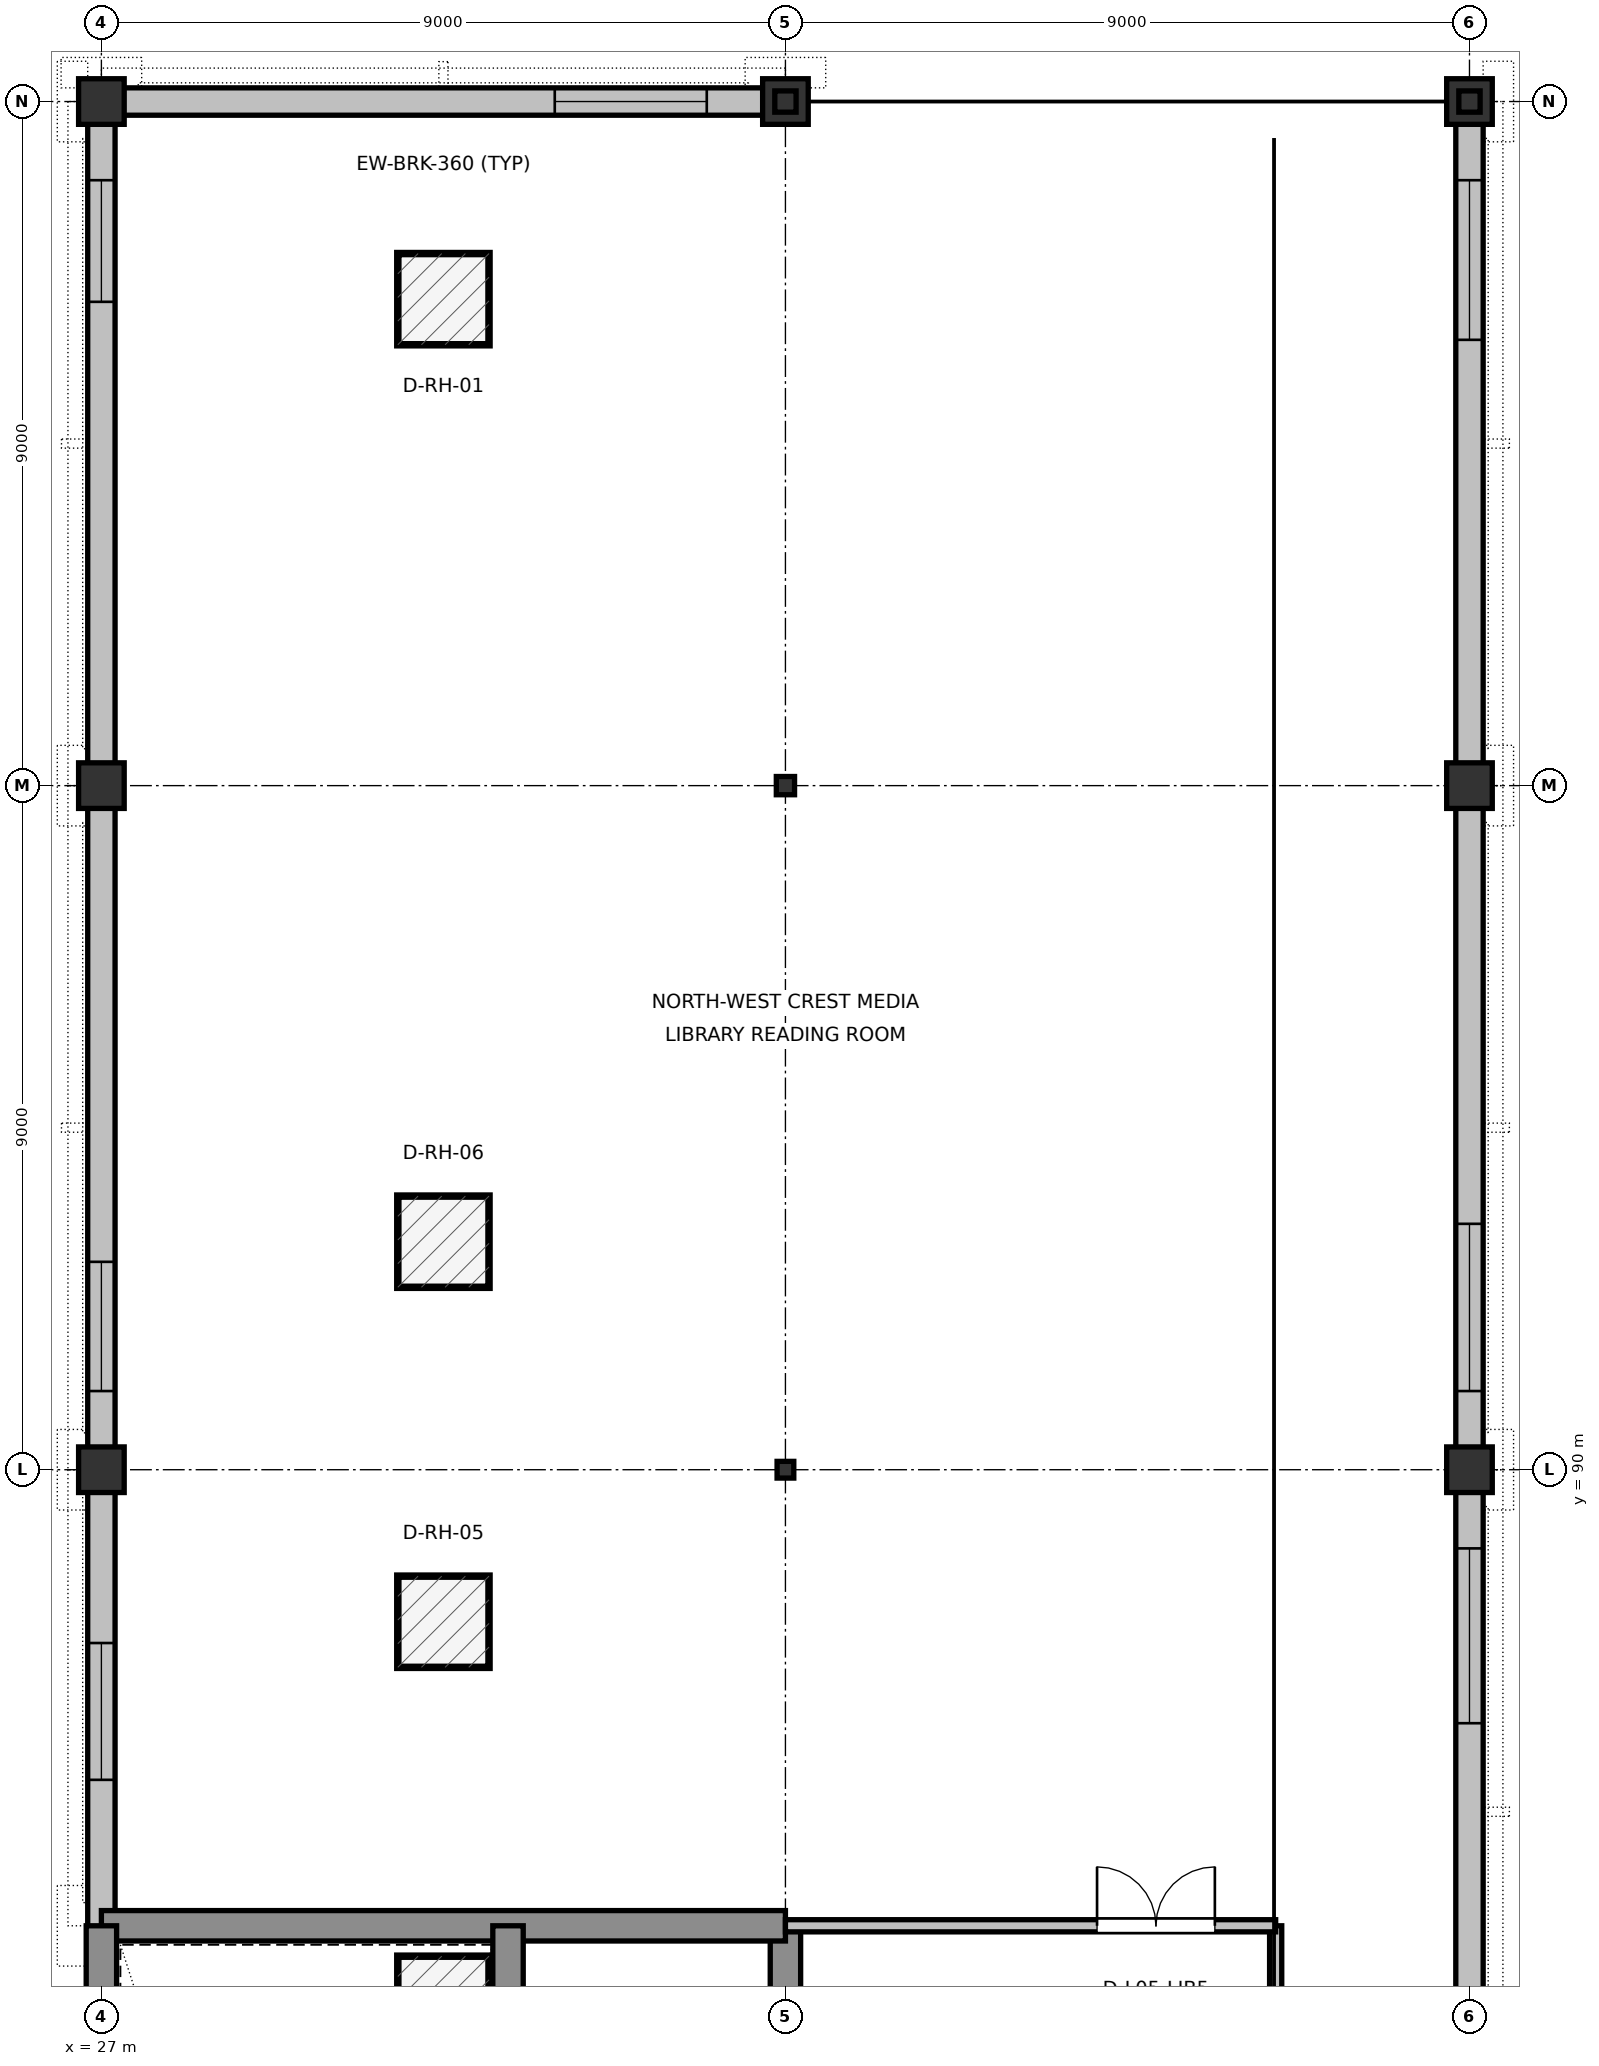
"""IFC4 building model, lengths in metres.
Left out: names, types, materials, properties, quantities, classifications, styles, units other than length and angle.
Written with IfcOpenShell. Run it as: python <this file> out.ifc"""

import sys

from ifc_helpers import new_model, si_unit, direction, frame, frame_2d, origin, origin_2d, place, context, subcontext, project, spatial, rectangle, hollow_rectangle, i_section, extrude, element, fill, save


model = new_model("IFC4")
c1 = context("Model", 3, precision=1e-05, world=origin(), true_north=direction((0.0, 1.0)))
c2 = subcontext(c1, "Body", "Model", "MODEL_VIEW")
j1 = project(units=[si_unit("LENGTHUNIT", "METRE"), si_unit("PLANEANGLEUNIT", "RADIAN")], contexts=[c1])
p1 = place(None, origin())
s1 = spatial("IfcSite", under=j1, at=p1, CompositionType="ELEMENT")
p2 = place(p1, origin())
s2 = spatial("IfcBuilding", under=s1, at=p2, CompositionType="ELEMENT")
p3 = place(p2, frame((0.0, 0.0, 23.4)))
s3 = spatial("IfcBuildingStorey", under=s2, at=p3, CompositionType="ELEMENT", Elevation=23.4)
for number, where, z_axis, x_axis in (
    (1, (27.0, 90.0, 0.0), (0.0, 0.0, 1.0), (1.0, 0.0, 0.0)),
    (2, (27.0, 99.0, 0.0), (0.0, 0.0, 1.0), (1.0, 0.0, 0.0)),
    (3, (27.0, 108.0, 0.0), (0.0, 0.0, 1.0), (1.0, 0.0, 0.0)),
):
    element("IfcColumn", number, at=place(p3, frame(where, z_axis=z_axis, x_axis=x_axis)), inside=s3, PredefinedType="COLUMN", context=c2, shape_type="SweptSolid", body=[
        extrude(rectangle(XDim=0.6, YDim=0.6, at=origin_2d()), origin(), (0.0, 0.0, 1.0), 4.2),
    ])
p4 = place(p3, frame((36.0, 90.0, 0.0), z_axis=(0.0, 0.0, 1.0), x_axis=(1.0, 0.0, 0.0)))
e4 = element("IfcColumn", 4, at=p4, inside=s3, PredefinedType="COLUMN", context=c2, shape_type="SweptSolid", body=[
    extrude(hollow_rectangle(XDim=0.22, YDim=0.22, WallThickness=0.012, at=origin_2d()), origin(), (0.0, 0.0, 1.0), 4.2),
])
p5 = place(p3, frame((36.0, 99.0, 0.0), z_axis=(0.0, 0.0, 1.0), x_axis=(1.0, 0.0, 0.0)))
e5 = element("IfcColumn", 5, at=p5, inside=s3, PredefinedType="COLUMN", context=c2, shape_type="SweptSolid", body=[
    extrude(i_section(OverallWidth=0.24, OverallDepth=0.24, WebThickness=0.01, FlangeThickness=0.017, at=origin_2d()), origin(), (0.0, 0.0, 1.0), 4.2),
])
for number, where, z_axis, x_axis in (
    (6, (36.0, 108.0, 0.0), (0.0, 0.0, 1.0), (1.0, 0.0, 0.0)),
    (7, (45.0, 90.0, 0.0), (0.0, 0.0, 1.0), (1.0, 0.0, 0.0)),
    (8, (45.0, 99.0, 0.0), (0.0, 0.0, 1.0), (1.0, 0.0, 0.0)),
    (9, (45.0, 108.0, 0.0), (0.0, 0.0, 1.0), (1.0, 0.0, 0.0)),
):
    element("IfcColumn", number, at=place(p3, frame(where, z_axis=z_axis, x_axis=x_axis)), inside=s3, PredefinedType="COLUMN", context=c2, shape_type="SweptSolid", body=[
        extrude(rectangle(XDim=0.6, YDim=0.6, at=origin_2d()), origin(), (0.0, 0.0, 1.0), 4.2),
    ])
p6 = place(p3, frame((36.0, 108.0, 4.2), z_axis=(0.0, 0.0, 1.0), x_axis=(1.0, 0.0, 0.0)))
e10 = element("IfcColumn", 10, at=p6, inside=s3, PredefinedType="COLUMN", context=c2, shape_type="SweptSolid", body=[
    extrude(i_section(OverallWidth=0.28, OverallDepth=0.28, WebThickness=0.01, FlangeThickness=0.018, at=origin_2d()), origin(), (0.0, 0.0, 1.0), 2.54),
])
p7 = place(p3, frame((45.0, 108.0, 4.2), z_axis=(0.0, 0.0, 1.0), x_axis=(1.0, 0.0, 0.0)))
e11 = element("IfcColumn", 11, at=p7, inside=s3, PredefinedType="COLUMN", context=c2, shape_type="SweptSolid", body=[
    extrude(i_section(OverallWidth=0.28, OverallDepth=0.28, WebThickness=0.01, FlangeThickness=0.018, at=origin_2d()), origin(), (0.0, 0.0, 1.0), 0.5),
])
p8 = place(p3, frame((45.0, 81.285, 0.0), z_axis=(0.0, 0.0, 1.0), x_axis=(0.0, 1.0, 0.0)))
e12 = element("IfcWall", 12, at=p8, inside=s3, PredefinedType="STANDARD", context=c2, shape_type="SweptSolid", body=[
    extrude(rectangle(XDim=8.43, YDim=0.36, at=frame_2d((4.215, 0.0))), origin(), (0.0, 0.0, 1.0), 3.94),
])
p9 = place(p8, frame((5.38, 0.0, 0.9)))
e13 = element("IfcOpeningElement", 13, at=p9, cuts=e12, PredefinedType="OPENING", context=c2, shape_type="SweptSolid", body=[
    extrude(rectangle(XDim=2.3, YDim=2.35, at=frame_2d((1.15, 1.175))), frame((0.0, 0.19, 0.0), z_axis=(0.0, -1.0, 0.0), x_axis=(1.0, 0.0, 0.0)), (0.0, 0.0, 1.0), 0.38),
])
p10 = place(p3, frame((45.0, 90.285, 0.0), z_axis=(0.0, 0.0, 1.0), x_axis=(0.0, 1.0, 0.0)))
e14 = element("IfcWall", 14, at=p10, inside=s3, PredefinedType="STANDARD", context=c2, shape_type="SweptSolid", body=[
    extrude(rectangle(XDim=8.43, YDim=0.36, at=frame_2d((4.215, 0.0))), origin(), (0.0, 0.0, 1.0), 3.94),
])
p11 = place(p10, frame((0.75, 0.0, 0.9)))
e15 = element("IfcOpeningElement", 15, at=p11, cuts=e14, PredefinedType="OPENING", context=c2, shape_type="SweptSolid", body=[
    extrude(rectangle(XDim=2.2, YDim=2.3, at=frame_2d((1.1, 1.15))), frame((0.0, 0.19, 0.0), z_axis=(0.0, -1.0, 0.0), x_axis=(1.0, 0.0, 0.0)), (0.0, 0.0, 1.0), 0.38),
])
p12 = place(p3, frame((45.0, 99.285, 0.0), z_axis=(0.0, 0.0, 1.0), x_axis=(0.0, 1.0, 0.0)))
e16 = element("IfcWall", 16, at=p12, inside=s3, PredefinedType="STANDARD", context=c2, shape_type="SweptSolid", body=[
    extrude(rectangle(XDim=8.43, YDim=0.36, at=frame_2d((4.215, 0.0))), origin(), (0.0, 0.0, 1.0), 3.94),
])
p13 = place(p12, frame((5.58, 0.0, 0.9)))
e17 = element("IfcOpeningElement", 17, at=p13, cuts=e16, PredefinedType="OPENING", context=c2, shape_type="SweptSolid", body=[
    extrude(rectangle(XDim=2.1, YDim=2.25, at=frame_2d((1.05, 1.125))), frame((0.0, 0.19, 0.0), z_axis=(0.0, -1.0, 0.0), x_axis=(1.0, 0.0, 0.0)), (0.0, 0.0, 1.0), 0.38),
])
p14 = place(p3, frame((35.715, 108.0, 0.0), z_axis=(0.0, 0.0, 1.0), x_axis=(-1.0, 0.0, 0.0)))
e18 = element("IfcWall", 18, at=p14, inside=s3, PredefinedType="STANDARD", context=c2, shape_type="SweptSolid", body=[
    extrude(rectangle(XDim=8.43, YDim=0.36, at=frame_2d((4.215, 0.0))), origin(), (0.0, 0.0, 1.0), 3.715),
])
p15 = place(p14, frame((0.75, 0.0, 0.9)))
e19 = element("IfcOpeningElement", 19, at=p15, cuts=e18, PredefinedType="OPENING", context=c2, shape_type="SweptSolid", body=[
    extrude(rectangle(XDim=2.0, YDim=2.2, at=frame_2d((1.0, 1.1))), frame((0.0, 0.19, 0.0), z_axis=(0.0, -1.0, 0.0), x_axis=(1.0, 0.0, 0.0)), (0.0, 0.0, 1.0), 0.38),
])
p16 = place(p3, frame((27.0, 89.715, 0.0), z_axis=(0.0, 0.0, 1.0), x_axis=(0.0, -1.0, 0.0)))
e20 = element("IfcWall", 20, at=p16, inside=s3, PredefinedType="STANDARD", context=c2, shape_type="SweptSolid", body=[
    extrude(rectangle(XDim=5.79, YDim=0.36, at=frame_2d((2.895, 0.0))), origin(), (0.0, 0.0, 1.0), 3.715),
])
p17 = place(p16, frame((1.995, 0.0, 0.9)))
e21 = element("IfcOpeningElement", 21, at=p17, cuts=e20, PredefinedType="OPENING", context=c2, shape_type="SweptSolid", body=[
    extrude(rectangle(XDim=1.8, YDim=2.1, at=frame_2d((0.9, 1.05))), frame((0.0, 0.19, 0.0), z_axis=(0.0, -1.0, 0.0), x_axis=(1.0, 0.0, 0.0)), (0.0, 0.0, 1.0), 0.38),
])
p18 = place(p3, frame((27.0, 98.715, 0.0), z_axis=(0.0, 0.0, 1.0), x_axis=(0.0, -1.0, 0.0)))
e22 = element("IfcWall", 22, at=p18, inside=s3, PredefinedType="STANDARD", context=c2, shape_type="SweptSolid", body=[
    extrude(rectangle(XDim=8.43, YDim=0.36, at=frame_2d((4.215, 0.0))), origin(), (0.0, 0.0, 1.0), 3.715),
])
p19 = place(p18, frame((5.98, 0.0, 0.9)))
e23 = element("IfcOpeningElement", 23, at=p19, cuts=e22, PredefinedType="OPENING", context=c2, shape_type="SweptSolid", body=[
    extrude(rectangle(XDim=1.7, YDim=2.05, at=frame_2d((0.85, 1.025))), frame((0.0, 0.19, 0.0), z_axis=(0.0, -1.0, 0.0), x_axis=(1.0, 0.0, 0.0)), (0.0, 0.0, 1.0), 0.38),
])
p20 = place(p3, frame((27.0, 107.715, 0.0), z_axis=(0.0, 0.0, 1.0), x_axis=(0.0, -1.0, 0.0)))
e24 = element("IfcWall", 24, at=p20, inside=s3, PredefinedType="STANDARD", context=c2, shape_type="SweptSolid", body=[
    extrude(rectangle(XDim=8.43, YDim=0.36, at=frame_2d((4.215, 0.0))), origin(), (0.0, 0.0, 1.0), 3.715),
])
p21 = place(p20, frame((0.75, 0.0, 0.9)))
e25 = element("IfcOpeningElement", 25, at=p21, cuts=e24, PredefinedType="OPENING", context=c2, shape_type="SweptSolid", body=[
    extrude(rectangle(XDim=1.6, YDim=2.0, at=frame_2d((0.8, 1.0))), frame((0.0, 0.19, 0.0), z_axis=(0.0, -1.0, 0.0), x_axis=(1.0, 0.0, 0.0)), (0.0, 0.0, 1.0), 0.38),
])
p22 = place(p3, frame((36.0, 66.0, 0.0), z_axis=(0.0, 0.0, 1.0), x_axis=(0.0, 1.0, 0.0)))
e26 = element("IfcWall", 26, at=p22, inside=s3, PredefinedType="SHEAR", context=c2, shape_type="SweptSolid", body=[
    extrude(rectangle(XDim=18.0, YDim=0.4, at=frame_2d((9.0, 0.0))), origin(), (0.0, 0.0, 1.0), 3.96),
])
p23 = place(p22, frame((0.8, 0.0, 0.0)))
e27 = element("IfcOpeningElement", 27, at=p23, cuts=e26, PredefinedType="OPENING", context=c2, shape_type="SweptSolid", body=[
    extrude(rectangle(XDim=1.1, YDim=2.16, at=frame_2d((0.55, 1.08))), frame((0.0, 0.21, 0.0), z_axis=(0.0, -1.0, 0.0), x_axis=(1.0, 0.0, 0.0)), (0.0, 0.0, 1.0), 0.42),
])
p24 = place(p22, frame((3.2, 0.0, 0.0)))
e28 = element("IfcOpeningElement", 28, at=p24, cuts=e26, PredefinedType="OPENING", context=c2, shape_type="SweptSolid", body=[
    extrude(rectangle(XDim=1.2, YDim=2.2, at=frame_2d((0.6, 1.1))), frame((0.0, 0.21, 0.0), z_axis=(0.0, -1.0, 0.0), x_axis=(1.0, 0.0, 0.0)), (0.0, 0.0, 1.0), 0.42),
])
p25 = place(p22, frame((6.8, 0.0, 0.0)))
e29 = element("IfcOpeningElement", 29, at=p25, cuts=e26, PredefinedType="OPENING", context=c2, shape_type="SweptSolid", body=[
    extrude(rectangle(XDim=0.85, YDim=2.1, at=frame_2d((0.425, 1.05))), frame((0.0, 0.21, 0.0), z_axis=(0.0, -1.0, 0.0), x_axis=(1.0, 0.0, 0.0)), (0.0, 0.0, 1.0), 0.42),
])
p26 = place(p3, frame((36.0, 84.0, 0.0), z_axis=(0.0, 0.0, 1.0), x_axis=(-1.0, 0.0, 0.0)))
e30 = element("IfcWall", 30, at=p26, inside=s3, PredefinedType="SHEAR", context=c2, shape_type="SweptSolid", body=[
    extrude(rectangle(XDim=9.0, YDim=0.4, at=frame_2d((4.5, 0.0))), origin(), (0.0, 0.0, 1.0), 3.96),
])
p27 = place(p3, frame((27.0, 84.0, 0.0), z_axis=(0.0, 0.0, 1.0), x_axis=(0.0, -1.0, 0.0)))
e31 = element("IfcWall", 31, at=p27, inside=s3, PredefinedType="SHEAR", context=c2, shape_type="SweptSolid", body=[
    extrude(rectangle(XDim=18.0, YDim=0.4, at=frame_2d((9.0, 0.0))), origin(), (0.0, 0.0, 1.0), 3.96),
])
p28 = place(p3, frame((32.35, 66.0, 0.0), z_axis=(0.0, 0.0, 1.0), x_axis=(0.0, 1.0, 0.0)))
e32 = element("IfcWall", 32, at=p28, inside=s3, PredefinedType="SHEAR", context=c2, shape_type="SweptSolid", body=[
    extrude(rectangle(XDim=18.0, YDim=0.4, at=frame_2d((9.0, 0.0))), origin(), (0.0, 0.0, 1.0), 3.96),
])
p29 = place(p28, frame((0.7, 0.0, 0.0)))
e33 = element("IfcOpeningElement", 33, at=p29, cuts=e32, PredefinedType="OPENING", context=c2, shape_type="SweptSolid", body=[
    extrude(rectangle(XDim=1.1, YDim=2.16, at=frame_2d((0.55, 1.08))), frame((0.0, 0.21, 0.0), z_axis=(0.0, -1.0, 0.0), x_axis=(1.0, 0.0, 0.0)), (0.0, 0.0, 1.0), 0.42),
])
p30 = place(p3, frame((42.45, 63.0, 0.0), z_axis=(0.0, 0.0, 1.0), x_axis=(0.0, 1.0, 0.0)))
e34 = element("IfcWall", 34, at=p30, inside=s3, PredefinedType="PARTITIONING", context=c2, shape_type="SweptSolid", body=[
    extrude(rectangle(XDim=21.0, YDim=0.16, at=frame_2d((10.5, 0.0))), origin(), (0.0, 0.0, 1.0), 3.96),
])
p31 = place(p3, frame((36.0, 84.0, 0.0), z_axis=(0.0, 0.0, 1.0), x_axis=(1.0, 0.0, 0.0)))
e35 = element("IfcWall", 35, at=p31, inside=s3, PredefinedType="PARTITIONING", context=c2, shape_type="SweptSolid", body=[
    extrude(rectangle(XDim=6.45, YDim=0.16, at=frame_2d((3.225, 0.0))), origin(), (0.0, 0.0, 1.0), 3.96),
])
p32 = place(p31, frame((4.1, 0.0, 0.0)))
e36 = element("IfcOpeningElement", 36, at=p32, cuts=e35, PredefinedType="OPENING", context=c2, shape_type="SweptSolid", body=[
    extrude(rectangle(XDim=1.55, YDim=2.24, at=frame_2d((0.775, 1.12))), frame((0.0, 0.09, 0.0), z_axis=(0.0, -1.0, 0.0), x_axis=(1.0, 0.0, 0.0)), (0.0, 0.0, 1.0), 0.18),
])
p33 = place(p9, origin())
e37 = element("IfcWindow", 37, at=p33, inside=s3, PartitioningType="SINGLE_PANEL", PredefinedType="WINDOW", context=c2, shape_type="SweptSolid", body=[
    extrude(rectangle(XDim=2.3, YDim=2.35, at=frame_2d((1.15, 1.175))), frame((0.0, 0.03, 0.0), z_axis=(0.0, -1.0, 0.0), x_axis=(1.0, 0.0, 0.0)), (0.0, 0.0, 1.0), 0.06),
])
fill(e13, e37)
p34 = place(p11, origin())
e38 = element("IfcWindow", 38, at=p34, inside=s3, PartitioningType="SINGLE_PANEL", PredefinedType="WINDOW", context=c2, shape_type="SweptSolid", body=[
    extrude(rectangle(XDim=2.2, YDim=2.3, at=frame_2d((1.1, 1.15))), frame((0.0, 0.03, 0.0), z_axis=(0.0, -1.0, 0.0), x_axis=(1.0, 0.0, 0.0)), (0.0, 0.0, 1.0), 0.06),
])
fill(e15, e38)
p35 = place(p13, origin())
e39 = element("IfcWindow", 39, at=p35, inside=s3, PartitioningType="SINGLE_PANEL", PredefinedType="WINDOW", context=c2, shape_type="SweptSolid", body=[
    extrude(rectangle(XDim=2.1, YDim=2.25, at=frame_2d((1.05, 1.125))), frame((0.0, 0.03, 0.0), z_axis=(0.0, -1.0, 0.0), x_axis=(1.0, 0.0, 0.0)), (0.0, 0.0, 1.0), 0.06),
])
fill(e17, e39)
p36 = place(p15, origin())
e40 = element("IfcWindow", 40, at=p36, inside=s3, PartitioningType="SINGLE_PANEL", PredefinedType="WINDOW", context=c2, shape_type="SweptSolid", body=[
    extrude(rectangle(XDim=2.0, YDim=2.2, at=frame_2d((1.0, 1.1))), frame((0.0, 0.03, 0.0), z_axis=(0.0, -1.0, 0.0), x_axis=(1.0, 0.0, 0.0)), (0.0, 0.0, 1.0), 0.06),
])
fill(e19, e40)
p37 = place(p17, origin())
e41 = element("IfcWindow", 41, at=p37, inside=s3, PartitioningType="SINGLE_PANEL", PredefinedType="WINDOW", context=c2, shape_type="SweptSolid", body=[
    extrude(rectangle(XDim=1.8, YDim=2.1, at=frame_2d((0.9, 1.05))), frame((0.0, 0.03, 0.0), z_axis=(0.0, -1.0, 0.0), x_axis=(1.0, 0.0, 0.0)), (0.0, 0.0, 1.0), 0.06),
])
fill(e21, e41)
p38 = place(p19, origin())
e42 = element("IfcWindow", 42, at=p38, inside=s3, PartitioningType="SINGLE_PANEL", PredefinedType="WINDOW", context=c2, shape_type="SweptSolid", body=[
    extrude(rectangle(XDim=1.7, YDim=2.05, at=frame_2d((0.85, 1.025))), frame((0.0, 0.03, 0.0), z_axis=(0.0, -1.0, 0.0), x_axis=(1.0, 0.0, 0.0)), (0.0, 0.0, 1.0), 0.06),
])
fill(e23, e42)
p39 = place(p21, origin())
e43 = element("IfcWindow", 43, at=p39, inside=s3, PartitioningType="SINGLE_PANEL", PredefinedType="WINDOW", context=c2, shape_type="SweptSolid", body=[
    extrude(rectangle(XDim=1.6, YDim=2.0, at=frame_2d((0.8, 1.0))), frame((0.0, 0.03, 0.0), z_axis=(0.0, -1.0, 0.0), x_axis=(1.0, 0.0, 0.0)), (0.0, 0.0, 1.0), 0.06),
])
fill(e25, e43)
p40 = place(p2, frame((0.0, 0.0, 40.2)))
p41 = place(p40, frame((0.0, 0.0, -12.84)))
p42 = place(p41, frame((31.5, 105.4, 0.0)))
p43 = place(p42, frame((0.0, 0.0, 0.19)))
e44 = element("IfcDoor", 44, at=p43, inside=s3, OperationType="SINGLE_SWING_LEFT", PredefinedType="TRAPDOOR", context=c2, shape_type="SweptSolid", body=[
    extrude(rectangle(XDim=1.2, YDim=1.2, at=origin_2d()), origin(), (0.0, 0.0, 1.0), 0.05),
])
p44 = place(p41, frame((31.5, 83.0, 0.0)))
p45 = place(p44, frame((0.0, 0.0, 0.19)))
e45 = element("IfcDoor", 45, at=p45, inside=s3, OperationType="SINGLE_SWING_LEFT", PredefinedType="TRAPDOOR", context=c2, shape_type="SweptSolid", body=[
    extrude(rectangle(XDim=1.2, YDim=1.2, at=origin_2d()), origin(), (0.0, 0.0, 1.0), 0.05),
])
p46 = place(p41, frame((31.5, 88.0, 0.0)))
p47 = place(p46, frame((0.0, 0.0, 0.19)))
e46 = element("IfcDoor", 46, at=p47, inside=s3, OperationType="SINGLE_SWING_LEFT", PredefinedType="TRAPDOOR", context=c2, shape_type="SweptSolid", body=[
    extrude(rectangle(XDim=1.2, YDim=1.2, at=origin_2d()), origin(), (0.0, 0.0, 1.0), 0.05),
])
p48 = place(p41, frame((31.5, 93.0, 0.0)))
p49 = place(p48, frame((0.0, 0.0, 0.19)))
e47 = element("IfcDoor", 47, at=p49, inside=s3, OperationType="SINGLE_SWING_LEFT", PredefinedType="TRAPDOOR", context=c2, shape_type="SweptSolid", body=[
    extrude(rectangle(XDim=1.2, YDim=1.2, at=origin_2d()), origin(), (0.0, 0.0, 1.0), 0.05),
])
p50 = place(p32, origin())
e48 = element("IfcDoor", 48, at=p50, inside=s3, OperationType="DOUBLE_DOOR_SINGLE_SWING", PredefinedType="DOOR", context=c2, shape_type="SweptSolid", body=[
    extrude(rectangle(XDim=1.55, YDim=2.24, at=frame_2d((0.775, 1.12))), frame((0.0, 0.025, 0.0), z_axis=(0.0, -1.0, 0.0), x_axis=(1.0, 0.0, 0.0)), (0.0, 0.0, 1.0), 0.05),
])
fill(e36, e48)
save(model, sys.argv[1])
